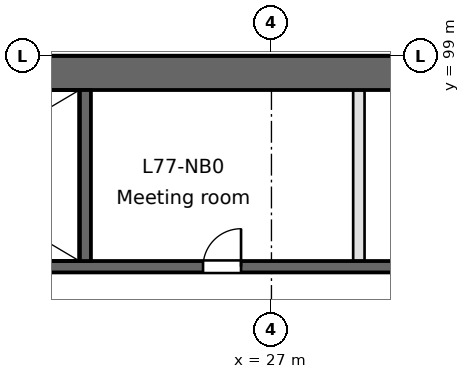
"""IFC4 building model, lengths in metres.
Left out: names, types, materials, properties, quantities, classifications, styles, units other than length and angle.
Written with IfcOpenShell. Run it as: python <this file> out.ifc"""

import sys

from ifc_helpers import new_model, si_unit, direction, frame, frame_2d, origin, place, context, subcontext, project, spatial, rectangle, extrude, element, fill, save


model = new_model("IFC4")
c1 = context("Model", 3, precision=1e-05, world=origin(), true_north=direction((0.0, 1.0)))
c2 = subcontext(c1, "Body", "Model", "MODEL_VIEW")
j1 = project(units=[si_unit("LENGTHUNIT", "METRE"), si_unit("PLANEANGLEUNIT", "RADIAN")], contexts=[c1])
p1 = place(None, origin())
s1 = spatial("IfcSite", under=j1, at=p1, CompositionType="ELEMENT")
p2 = place(p1, origin())
s2 = spatial("IfcBuilding", under=s1, at=p2, CompositionType="ELEMENT")
p3 = place(p2, frame((0.0, 0.0, 299.3)))
s3 = spatial("IfcBuildingStorey", under=s2, at=p3, CompositionType="ELEMENT", Elevation=299.3)
p4 = place(p3, frame((49.5, 98.55, 0.0), z_axis=(0.0, 0.0, 1.0), x_axis=(-1.0, 0.0, 0.0)))
e1 = element("IfcWall", 1, at=p4, inside=s3, PredefinedType="SHEAR", context=c2, shape_type="SweptSolid", body=[
    extrude(rectangle(XDim=45.0, YDim=0.9, at=frame_2d((22.5, 0.0))), origin(), (0.0, 0.0, 1.0), 3.7),
])
p5 = place(p3, frame((0.9, 93.45, -0.4), z_axis=(0.0, 0.0, 1.0), x_axis=(1.0, 0.0, 0.0)))
e2 = element("IfcWall", 2, at=p5, inside=s3, PredefinedType="SOLIDWALL", context=c2, shape_type="SweptSolid", body=[
    extrude(rectangle(XDim=34.6, YDim=0.3, at=frame_2d((17.3, 0.0))), origin(), (0.0, 0.0, 1.0), 3.65),
])
p6 = place(p5, frame((9.7, 0.0, 0.4)))
e3 = element("IfcOpeningElement", 3, at=p6, cuts=e2, PredefinedType="OPENING", context=c2, shape_type="SweptSolid", body=[
    extrude(rectangle(XDim=1.2, YDim=2.1, at=frame_2d((0.6, 1.05))), frame((0.0, 0.15, 0.0), z_axis=(0.0, -1.0, 0.0), x_axis=(1.0, 0.0, 0.0)), (0.0, 0.0, 1.0), 0.3),
])
p7 = place(p5, frame((24.3, 0.0, 0.4)))
e4 = element("IfcOpeningElement", 4, at=p7, cuts=e2, PredefinedType="OPENING", context=c2, shape_type="SweptSolid", body=[
    extrude(rectangle(XDim=1.0, YDim=2.1, at=frame_2d((0.5, 1.05))), frame((0.0, 0.15, 0.0), z_axis=(0.0, -1.0, 0.0), x_axis=(1.0, 0.0, 0.0)), (0.0, 0.0, 1.0), 0.3),
])
p8 = place(p5, frame((31.125, 0.0, 0.4)))
e5 = element("IfcOpeningElement", 5, at=p8, cuts=e2, PredefinedType="OPENING", context=c2, shape_type="SweptSolid", body=[
    extrude(rectangle(XDim=1.0, YDim=2.1, at=frame_2d((0.5, 1.05))), frame((0.0, 0.15, 0.0), z_axis=(0.0, -1.0, 0.0), x_axis=(1.0, 0.0, 0.0)), (0.0, 0.0, 1.0), 0.3),
])
p9 = place(p3, frame((22.1, 93.6, -0.4), z_axis=(0.0, 0.0, 1.0), x_axis=(0.0, 1.0, 0.0)))
e6 = element("IfcWall", 6, at=p9, inside=s3, PredefinedType="SOLIDWALL", context=c2, shape_type="SweptSolid", body=[
    extrude(rectangle(XDim=4.5, YDim=0.3, at=frame_2d((2.25, 0.0))), origin(), (0.0, 0.0, 1.0), 3.65),
])
p10 = place(p3, frame((29.3, 93.6, 0.0), z_axis=(0.0, 0.0, 1.0), x_axis=(0.0, 1.0, 0.0)))
e7 = element("IfcWall", 7, at=p10, inside=s3, PredefinedType="PARTITIONING", context=c2, shape_type="SweptSolid", body=[
    extrude(rectangle(XDim=4.5, YDim=0.3, at=frame_2d((2.25, 0.0))), origin(), (0.0, 0.0, 1.0), 3.25),
])
p11 = place(p7, origin())
e8 = element("IfcDoor", 8, at=p11, inside=s3, OperationType="SINGLE_SWING_RIGHT", PredefinedType="DOOR", context=c2, shape_type="SweptSolid", body=[
    extrude(rectangle(XDim=1.0, YDim=2.1, at=frame_2d((0.5, 1.05))), frame((0.0, 0.025, 0.0), z_axis=(0.0, -1.0, 0.0), x_axis=(1.0, 0.0, 0.0)), (0.0, 0.0, 1.0), 0.05),
])
fill(e4, e8)
save(model, sys.argv[1])
